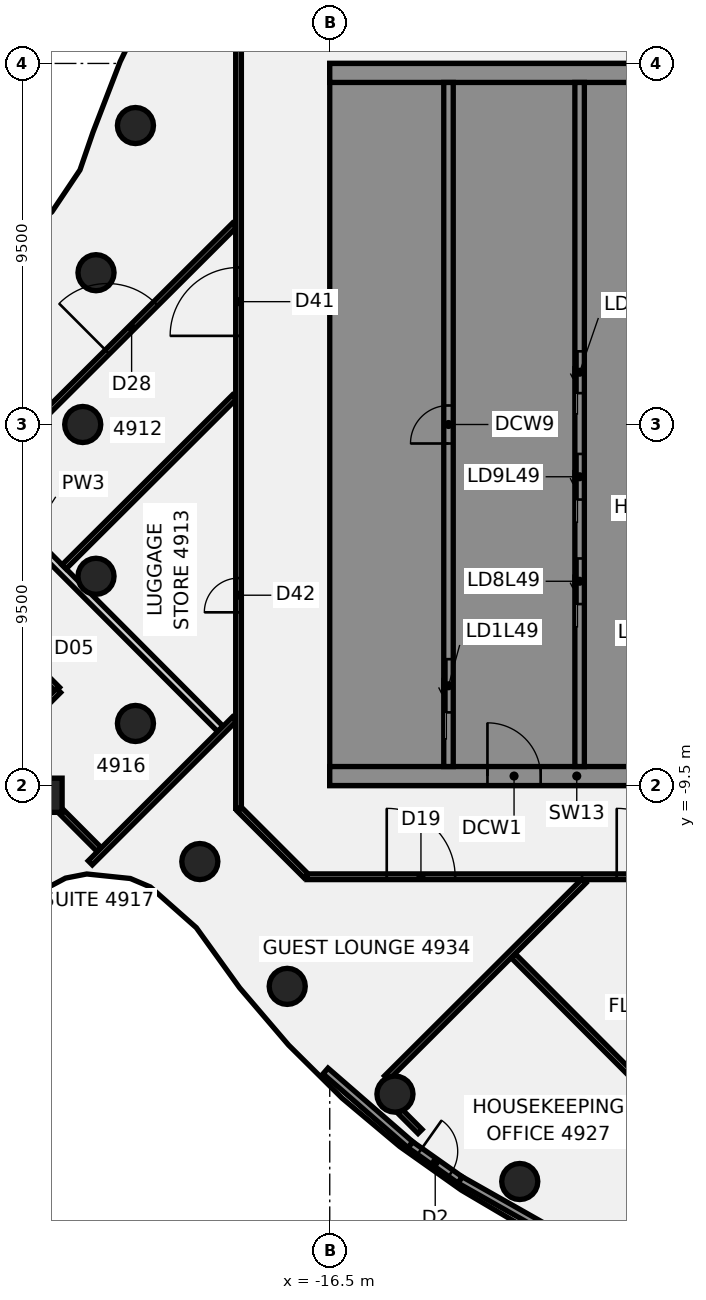
"""IFC4 building model, lengths in metres.
Left out: names, types, materials, properties, quantities, classifications, styles, units other than length and angle.
Written with IfcOpenShell. Run it as: python <this file> out.ifc"""

import sys

from ifc_helpers import new_model, si_unit, direction, frame, frame_2d, origin, origin_2d, place, context, subcontext, project, spatial, polyline, rectangle, circle, outline, extrude, element, fill, save


model = new_model("IFC4")
c1 = context("Model", 3, precision=1e-05, world=origin(), true_north=direction((0.0, 1.0)))
c2 = subcontext(c1, "Body", "Model", "MODEL_VIEW")
j1 = project(units=[si_unit("LENGTHUNIT", "METRE"), si_unit("PLANEANGLEUNIT", "RADIAN")], contexts=[c1])
p1 = place(None, origin())
s1 = spatial("IfcSite", under=j1, at=p1, CompositionType="ELEMENT")
p2 = place(p1, origin())
s2 = spatial("IfcBuilding", under=s1, at=p2, CompositionType="ELEMENT")
p3 = place(p2, frame((0.0, 0.0, 196.9)))
s3 = spatial("IfcBuildingStorey", under=s2, at=p3, CompositionType="ELEMENT", Elevation=196.9)
for number, where, z_axis, x_axis in (
    (1, (-21.613, 7.866, -0.14), (0.0, 0.0, 1.0), (1.0, 0.0, 0.0)),
    (2, (-22.651, 3.994, -0.14), (0.0, 0.0, 1.0), (1.0, 0.0, 0.0)),
    (3, (-23.0, 0.0, -0.14), (0.0, 0.0, 1.0), (1.0, 0.0, 0.0)),
    (4, (-22.651, -3.994, -0.14), (0.0, 0.0, 1.0), (1.0, 0.0, 0.0)),
    (5, (-21.613, -7.866, -0.14), (0.0, 0.0, 1.0), (1.0, 0.0, 0.0)),
    (6, (-19.919, -11.5, -0.14), (0.0, 0.0, 1.0), (1.0, 0.0, 0.0)),
    (7, (-17.619, -14.784, -0.14), (0.0, 0.0, 1.0), (1.0, 0.0, 0.0)),
    (8, (-14.784, -17.619, -0.14), (0.0, 0.0, 1.0), (1.0, 0.0, 0.0)),
    (9, (-11.5, -19.919, -0.14), (0.0, 0.0, 1.0), (1.0, 0.0, 0.0)),
):
    element("IfcColumn", number, at=place(p3, frame(where, z_axis=z_axis, x_axis=x_axis)), inside=s3, PredefinedType="COLUMN", context=c2, shape_type="SweptSolid", body=[
        extrude(circle(Radius=0.475, at=origin_2d()), origin(), (0.0, 0.0, 1.0), 3.6),
    ])
p4 = place(p3, frame((-23.992, -9.756, -0.139), z_axis=(0.04947892899, -0.009624668379, 0.998728792688), x_axis=(-0.705324503584, 0.70765331906, 0.041762718624)))
e10 = element("IfcColumn", 10, at=p4, inside=s3, PredefinedType="COLUMN", context=c2, shape_type="SweptSolid", body=[
    extrude(rectangle(XDim=0.9, YDim=0.9, at=origin_2d()), origin(), (0.0, 0.0, 1.0), 3.602),
])
p5 = place(p3, frame((-29.421, 2.059, 0.0), z_axis=(0.0, 0.0, 1.0), x_axis=(0.706204778192, -0.708007635029, 0.0)))
e11 = element("IfcWall", 11, at=p5, inside=s3, PredefinedType="PARTITIONING", context=c2, shape_type="SweptSolid", body=[
    extrude(rectangle(XDim=14.219, YDim=0.2, at=frame_2d((7.109, 0.0))), origin(), (0.0, 0.0, 1.0), 2.864),
])
p6 = place(p5, frame((5.799, 0.0, 0.0)))
e12 = element("IfcOpeningElement", 12, at=p6, cuts=e11, PredefinedType="OPENING", context=c2, shape_type="SweptSolid", body=[
    extrude(rectangle(XDim=1.4, YDim=2.1, at=frame_2d((0.7, 1.05))), frame((0.0, 0.11, 0.0), z_axis=(0.0, -1.0, 0.0), x_axis=(1.0, 0.0, 0.0)), (0.0, 0.0, 1.0), 0.22),
])
p7 = place(p3, frame((-23.564, -10.185, 0.0), z_axis=(0.0, 0.0, 1.0), x_axis=(0.706156079719, -0.708056206156, 0.0)))
e13 = element("IfcWall", 13, at=p7, inside=s3, PredefinedType="PARTITIONING", context=c2, shape_type="SweptSolid", body=[
    extrude(rectangle(XDim=1.413, YDim=0.15, at=frame_2d((0.707, 0.0))), origin(), (0.0, 0.0, 1.0), 2.864),
])
p8 = place(p3, frame((-25.415, -5.214, 0.0), z_axis=(0.0, 0.0, 1.0), x_axis=(0.706171032538, -0.708041293149, 0.0)))
e14 = element("IfcWall", 14, at=p8, inside=s3, PredefinedType="PARTITIONING", context=c2, shape_type="SweptSolid", body=[
    extrude(rectangle(XDim=2.48, YDim=0.15, at=frame_2d((1.24, 0.0))), origin(), (0.0, 0.0, 1.0), 2.864),
])
p9 = place(p8, frame((0.52, 0.0, 0.0)))
e15 = element("IfcOpeningElement", 15, at=p9, cuts=e14, PredefinedType="OPENING", context=c2, shape_type="SweptSolid", body=[
    extrude(rectangle(XDim=0.9, YDim=2.1, at=frame_2d((0.45, 1.05))), frame((0.0, 0.085, 0.0), z_axis=(0.0, -1.0, 0.0), x_axis=(1.0, 0.0, 0.0)), (0.0, 0.0, 1.0), 0.17),
])
p10 = place(p3, frame((-18.872, -10.128, 0.0), z_axis=(0.0, 0.0, 1.0), x_axis=(0.707106781187, -0.707106781187, 0.0)))
e16 = element("IfcWall", 16, at=p10, inside=s3, PredefinedType="PARTITIONING", context=c2, shape_type="SweptSolid", body=[
    extrude(rectangle(XDim=2.465, YDim=0.15, at=frame_2d((1.232, 0.0))), origin(), (0.0, 0.0, 1.0), 2.864),
])
p11 = place(p3, frame((-14.655, -18.069, 0.0), z_axis=(0.0, 0.0, 1.0), x_axis=(0.706295228239, -0.707917403775, 0.0)))
e17 = element("IfcWall", 17, at=p11, inside=s3, PredefinedType="PARTITIONING", context=c2, shape_type="SweptSolid", body=[
    extrude(rectangle(XDim=0.752, YDim=0.15, at=frame_2d((0.376, 0.0))), origin(), (0.0, 0.0, 1.0), 2.864),
])
p12 = place(p3, frame((-11.671, -13.981, 0.0), z_axis=(0.0, 0.0, 1.0), x_axis=(0.706230859369, -0.707981619306, 0.0)))
e18 = element("IfcWall", 18, at=p12, inside=s3, PredefinedType="PARTITIONING", context=c2, shape_type="SweptSolid", body=[
    extrude(rectangle(XDim=15.2, YDim=0.15, at=frame_2d((7.6, 0.0))), origin(), (0.0, 0.0, 1.0), 2.864),
])
p13 = place(p12, frame((9.37, 0.0, 0.0)))
e19 = element("IfcOpeningElement", 19, at=p13, cuts=e18, PredefinedType="OPENING", context=c2, shape_type="SweptSolid", body=[
    extrude(rectangle(XDim=0.9, YDim=2.1, at=frame_2d((0.45, 1.05))), frame((0.0, 0.085, 0.0), z_axis=(0.0, -1.0, 0.0), x_axis=(1.0, 0.0, 0.0)), (0.0, 0.0, 1.0), 0.17),
])
p14 = place(p3, frame((-17.1, -11.9, 0.0), z_axis=(0.0, 0.0, 1.0), x_axis=(1.0, 0.0, 0.0)))
e20 = element("IfcWall", 20, at=p14, inside=s3, PredefinedType="PARTITIONING", context=c2, shape_type="SweptSolid", body=[
    extrude(rectangle(XDim=34.165, YDim=0.15, at=frame_2d((17.083, 0.0))), origin(), (0.0, 0.0, 1.0), 2.864),
])
p15 = place(p14, frame((8.152, 0.0, 0.0)))
e21 = element("IfcOpeningElement", 21, at=p15, cuts=e20, PredefinedType="OPENING", context=c2, shape_type="SweptSolid", body=[
    extrude(rectangle(XDim=1.8, YDim=2.1, at=frame_2d((0.9, 1.05))), frame((0.0, 0.085, 0.0), z_axis=(0.0, -1.0, 0.0), x_axis=(1.0, 0.0, 0.0)), (0.0, 0.0, 1.0), 0.17),
])
p16 = place(p14, frame((2.1, 0.0, 0.0)))
e22 = element("IfcOpeningElement", 22, at=p16, cuts=e20, PredefinedType="OPENING", context=c2, shape_type="SweptSolid", body=[
    extrude(rectangle(XDim=1.8, YDim=2.1, at=frame_2d((0.9, 1.05))), frame((0.0, 0.085, 0.0), z_axis=(0.0, -1.0, 0.0), x_axis=(1.0, 0.0, 0.0)), (0.0, 0.0, 1.0), 0.17),
])
p17 = place(p14, frame((24.96, 0.0, 0.0)))
e23 = element("IfcOpeningElement", 23, at=p17, cuts=e20, PredefinedType="OPENING", context=c2, shape_type="SweptSolid", body=[
    extrude(rectangle(XDim=1.8, YDim=2.1, at=frame_2d((0.9, 1.05))), frame((0.0, 0.085, 0.0), z_axis=(0.0, -1.0, 0.0), x_axis=(1.0, 0.0, 0.0)), (0.0, 0.0, 1.0), 0.17),
])
p18 = place(p3, frame((-26.751, -10.106, 0.0), z_axis=(0.0, 0.0, 1.0), x_axis=(0.708021518616, 0.706190858888, 0.0)))
e24 = element("IfcWall", 24, at=p18, inside=s3, PredefinedType="PARTITIONING", context=c2, shape_type="SweptSolid", body=[
    extrude(rectangle(XDim=4.401, YDim=0.15, at=frame_2d((2.2, 0.0))), origin(), (0.0, 0.0, 1.0), 2.864),
])
p19 = place(p3, frame((-25.749, -1.48, 0.0), z_axis=(0.0, 0.0, 1.0), x_axis=(0.707978232656, 0.706234254398, 0.0)))
e25 = element("IfcWall", 25, at=p19, inside=s3, PredefinedType="PARTITIONING", context=c2, shape_type="SweptSolid", body=[
    extrude(rectangle(XDim=9.519, YDim=0.15, at=frame_2d((4.76, 0.0))), origin(), (0.0, 0.0, 1.0), 2.864),
])
p20 = place(p19, frame((4.8, 0.0, 0.0)))
e26 = element("IfcOpeningElement", 26, at=p20, cuts=e25, PredefinedType="OPENING", context=c2, shape_type="SweptSolid", body=[
    extrude(rectangle(XDim=1.8, YDim=2.1, at=frame_2d((0.9, 1.05))), frame((0.0, 0.085, 0.0), z_axis=(0.0, -1.0, 0.0), x_axis=(1.0, 0.0, 0.0)), (0.0, 0.0, 1.0), 0.17),
])
p21 = place(p3, frame((-23.49, -3.745, 0.0), z_axis=(0.0, 0.0, 1.0), x_axis=(0.708089983703, 0.706122209663, 0.0)))
e27 = element("IfcWall", 27, at=p21, inside=s3, PredefinedType="PARTITIONING", context=c2, shape_type="SweptSolid", body=[
    extrude(rectangle(XDim=6.328, YDim=0.15, at=frame_2d((3.164, 0.0))), origin(), (0.0, 0.0, 1.0), 2.864),
])
p22 = place(p3, frame((-22.801, -11.534, 0.0), z_axis=(0.0, 0.0, 1.0), x_axis=(0.707926878429, 0.706285731696, 0.0)))
e28 = element("IfcWall", 28, at=p22, inside=s3, PredefinedType="PARTITIONING", context=c2, shape_type="SweptSolid", body=[
    extrude(rectangle(XDim=5.355, YDim=0.15, at=frame_2d((2.678, 0.0))), origin(), (0.0, 0.0, 1.0), 2.864),
])
p23 = place(p3, frame((-15.006, -17.193, 0.0), z_axis=(0.0, 0.0, 1.0), x_axis=(0.708004144821, 0.706208277292, 0.0)))
e29 = element("IfcWall", 29, at=p23, inside=s3, PredefinedType="PARTITIONING", context=c2, shape_type="SweptSolid", body=[
    extrude(rectangle(XDim=7.341, YDim=0.15, at=frame_2d((3.67, 0.0))), origin(), (0.0, 0.0, 1.0), 2.864),
])
p24 = place(p3, frame((-18.9, -10.1, 0.0), z_axis=(0.0, 0.0, 1.0), x_axis=(0.0, 1.0, 0.0)))
e30 = element("IfcWall", 30, at=p24, inside=s3, PredefinedType="PARTITIONING", context=c2, shape_type="SweptSolid", body=[
    extrude(rectangle(XDim=20.2, YDim=0.15, at=frame_2d((10.1, 0.0))), origin(), (0.0, 0.0, 1.0), 2.864),
])
p25 = place(p24, frame((12.432, 0.0, 0.0)))
e31 = element("IfcOpeningElement", 31, at=p25, cuts=e30, PredefinedType="OPENING", context=c2, shape_type="SweptSolid", body=[
    extrude(rectangle(XDim=1.8, YDim=2.1, at=frame_2d((0.9, 1.05))), frame((0.0, 0.085, 0.0), z_axis=(0.0, -1.0, 0.0), x_axis=(1.0, 0.0, 0.0)), (0.0, 0.0, 1.0), 0.17),
])
p26 = place(p24, frame((5.158, 0.0, 0.0)))
e32 = element("IfcOpeningElement", 32, at=p26, cuts=e30, PredefinedType="OPENING", context=c2, shape_type="SweptSolid", body=[
    extrude(rectangle(XDim=0.9, YDim=2.1, at=frame_2d((0.45, 1.05))), frame((0.0, 0.085, 0.0), z_axis=(0.0, -1.0, 0.0), x_axis=(1.0, 0.0, 0.0)), (0.0, 0.0, 1.0), 0.17),
])
p27 = place(p3, frame((-16.611, -17.011, 0.0), z_axis=(0.0, 0.0, 1.0), x_axis=(0.754795534336, -0.65596013701, 0.0)))
e33 = element("IfcWall", 33, at=p27, inside=s3, PredefinedType="SOLIDWALL", context=c2, shape_type="SweptSolid", body=[
    extrude(rectangle(XDim=2.959, YDim=0.2, at=frame_2d((1.479, 0.0))), origin(), (0.0, 0.0, 1.0), 3.46),
])
p28 = place(p3, frame((-13.071, -19.876, 0.0), z_axis=(0.0, 0.0, 1.0), x_axis=(0.870261525936, -0.492589967899, 0.0)))
e34 = element("IfcWall", 34, at=p28, inside=s3, PredefinedType="SOLIDWALL", context=c2, shape_type="SweptSolid", body=[
    extrude(rectangle(XDim=2.959, YDim=0.2, at=frame_2d((1.48, 0.0))), origin(), (0.0, 0.0, 1.0), 3.46),
])
p29 = place(p3, frame((-14.377, -18.952, 0.0), z_axis=(0.0, 0.0, 1.0), x_axis=(0.816354223939, -0.57755153974, 0.0)))
e35 = element("IfcWall", 35, at=p29, inside=s3, PredefinedType="SOLIDWALL", context=c2, shape_type="SweptSolid", body=[
    extrude(rectangle(XDim=1.6, YDim=0.2, at=frame_2d((0.8, 0.0))), origin(), (0.0, 0.0, 1.0), 3.46),
])
p30 = place(p29, frame((0.3, 0.0, 0.0)))
e36 = element("IfcOpeningElement", 36, at=p30, cuts=e35, PredefinedType="OPENING", context=c2, shape_type="SweptSolid", body=[
    extrude(rectangle(XDim=1.0, YDim=2.4, at=frame_2d((0.5, 1.2))), frame((0.0, 0.11, 0.0), z_axis=(0.0, -1.0, 0.0), x_axis=(1.0, 0.0, 0.0)), (0.0, 0.0, 1.0), 0.22),
])
p31 = place(p3, frame((-16.5, -9.25, 0.0), z_axis=(0.0, 0.0, 1.0), x_axis=(1.0, 0.0, 0.0)))
e37 = element("IfcWall", 37, at=p31, inside=s3, PredefinedType="SHEAR", context=c2, shape_type="SweptSolid", body=[
    extrude(rectangle(XDim=13.0, YDim=0.5, at=frame_2d((6.5, 0.0))), origin(), (0.0, 0.0, 1.0), 3.46),
])
p32 = place(p31, frame((4.15, 0.0, 0.0)))
e38 = element("IfcOpeningElement", 38, at=p32, cuts=e37, PredefinedType="OPENING", context=c2, shape_type="SweptSolid", body=[
    extrude(rectangle(XDim=1.4, YDim=2.1, at=frame_2d((0.7, 1.05))), frame((0.0, 0.26, 0.0), z_axis=(0.0, -1.0, 0.0), x_axis=(1.0, 0.0, 0.0)), (0.0, 0.0, 1.0), 0.52),
])
p33 = place(p31, frame((10.125, 0.0, 0.0)))
e39 = element("IfcOpeningElement", 39, at=p33, cuts=e37, PredefinedType="OPENING", context=c2, shape_type="SweptSolid", body=[
    extrude(rectangle(XDim=1.4, YDim=2.1, at=frame_2d((0.7, 1.05))), frame((0.0, 0.26, 0.0), z_axis=(0.0, -1.0, 0.0), x_axis=(1.0, 0.0, 0.0)), (0.0, 0.0, 1.0), 0.52),
])
p34 = place(p3, origin())
e40 = element("IfcWall", 40, at=p34, inside=s3, PredefinedType="SHEAR", context=c2, shape_type="SweptSolid", body=[
    extrude(outline(polyline([(-13.5, -8.125), (-16.0, -8.125), (-16.0, -5.625), (-13.5, -5.625), (-13.5, -5.375), (-16.0, -5.375), (-16.0, 5.375), (-13.5, 5.375), (-13.5, 5.625), (-16.0, 5.625), (-16.0, 8.125), (-13.5, 8.125), (-13.5, 9.0), (-16.0, 9.0), (-16.5, 9.0), (-16.5, -9.0), (-16.0, -9.0), (-13.5, -9.0), (-13.5, -8.125)])), origin(), (0.0, 0.0, 1.0), 3.46),
])
p35 = place(p3, frame((-16.5, 9.25, 0.0), z_axis=(0.0, 0.0, 1.0), x_axis=(1.0, 0.0, 0.0)))
e41 = element("IfcWall", 41, at=p35, inside=s3, PredefinedType="SHEAR", context=c2, shape_type="SweptSolid", body=[
    extrude(rectangle(XDim=13.0, YDim=0.5, at=frame_2d((6.5, 0.0))), origin(), (0.0, 0.0, 1.0), 3.46),
])
p36 = place(p3, origin())
e42 = element("IfcWall", 42, at=p36, inside=s3, PredefinedType="SHEAR", context=c2, shape_type="SweptSolid", body=[
    extrude(outline(polyline([(-9.8, -5.375), (-9.8, -5.625), (-7.5, -5.625), (-7.25, -5.625), (-7.25, 9.0), (-7.5, 9.0), (-9.8, 9.0), (-9.8, 8.125), (-7.5, 8.125), (-7.5, 5.625), (-9.8, 5.625), (-9.8, 5.375), (-7.5, 5.375), (-7.5, 2.875), (-9.8, 2.875), (-9.8, 2.625), (-7.5, 2.625), (-7.5, 0.125), (-9.8, 0.125), (-9.8, -0.125), (-7.5, -0.125), (-7.5, -2.625), (-9.8, -2.625), (-9.8, -2.875), (-7.5, -2.875), (-7.5, -5.375), (-9.8, -5.375)])), origin(), (0.0, 0.0, 1.0), 3.46),
])
p37 = place(p3, origin())
e43 = element("IfcWall", 43, at=p37, inside=s3, PredefinedType="SHEAR", context=c2, shape_type="SweptSolid", body=[
    extrude(outline(polyline([(-7.5, -8.125), (-9.55, -8.125), (-9.55, -5.625), (-9.8, -5.625), (-9.8, -8.125), (-9.8, -9.0), (-7.5, -9.0), (-7.5, -8.125)])), origin(), (0.0, 0.0, 1.0), 3.46),
])
p38 = place(p3, frame((-13.375, -9.0, 0.0), z_axis=(0.0, 0.0, 1.0), x_axis=(0.0, 1.0, 0.0)))
e44 = element("IfcWall", 44, at=p38, inside=s3, PredefinedType="SHEAR", context=c2, shape_type="SweptSolid", body=[
    extrude(rectangle(XDim=18.0, YDim=0.25, at=frame_2d((9.0, 0.0))), origin(), (0.0, 0.0, 1.0), 3.46),
])
p39 = place(p38, frame((1.425, 0.0, 0.0)))
e45 = element("IfcOpeningElement", 45, at=p39, cuts=e44, PredefinedType="OPENING", context=c2, shape_type="SweptSolid", body=[
    extrude(rectangle(XDim=1.4, YDim=2.1, at=frame_2d((0.7, 1.05))), frame((0.0, 0.135, 0.0), z_axis=(0.0, -1.0, 0.0), x_axis=(1.0, 0.0, 0.0)), (0.0, 0.0, 1.0), 0.27),
])
p40 = place(p38, frame((8.5, 0.0, 0.0)))
e46 = element("IfcOpeningElement", 46, at=p40, cuts=e44, PredefinedType="OPENING", context=c2, shape_type="SweptSolid", body=[
    extrude(rectangle(XDim=1.0, YDim=2.1, at=frame_2d((0.5, 1.05))), frame((0.0, 0.135, 0.0), z_axis=(0.0, -1.0, 0.0), x_axis=(1.0, 0.0, 0.0)), (0.0, 0.0, 1.0), 0.27),
])
p41 = place(p3, frame((-9.925, -9.0, 0.0), z_axis=(0.0, 0.0, 1.0), x_axis=(0.0, 1.0, 0.0)))
e47 = element("IfcWall", 47, at=p41, inside=s3, PredefinedType="SHEAR", context=c2, shape_type="SweptSolid", body=[
    extrude(rectangle(XDim=18.0, YDim=0.25, at=frame_2d((9.0, 0.0))), origin(), (0.0, 0.0, 1.0), 3.46),
])
p42 = place(p41, frame((4.275, 0.0, 0.0)))
e48 = element("IfcOpeningElement", 48, at=p42, cuts=e47, PredefinedType="OPENING", context=c2, shape_type="SweptSolid", body=[
    extrude(rectangle(XDim=1.2, YDim=2.1, at=frame_2d((0.6, 1.05))), frame((0.0, 0.135, 0.0), z_axis=(0.0, -1.0, 0.0), x_axis=(1.0, 0.0, 0.0)), (0.0, 0.0, 1.0), 0.27),
])
p43 = place(p41, frame((7.025, 0.0, 0.0)))
e49 = element("IfcOpeningElement", 49, at=p43, cuts=e47, PredefinedType="OPENING", context=c2, shape_type="SweptSolid", body=[
    extrude(rectangle(XDim=1.2, YDim=2.1, at=frame_2d((0.6, 1.05))), frame((0.0, 0.135, 0.0), z_axis=(0.0, -1.0, 0.0), x_axis=(1.0, 0.0, 0.0)), (0.0, 0.0, 1.0), 0.27),
])
p44 = place(p41, frame((9.825, 0.0, 0.0)))
e50 = element("IfcOpeningElement", 50, at=p44, cuts=e47, PredefinedType="OPENING", context=c2, shape_type="SweptSolid", body=[
    extrude(rectangle(XDim=1.1, YDim=2.1, at=frame_2d((0.55, 1.05))), frame((0.0, 0.135, 0.0), z_axis=(0.0, -1.0, 0.0), x_axis=(1.0, 0.0, 0.0)), (0.0, 0.0, 1.0), 0.27),
])
p45 = place(p15, origin())
e51 = element("IfcDoor", 51, at=p45, inside=s3, OperationType="DOUBLE_DOOR_SINGLE_SWING", PredefinedType="DOOR", context=c2, shape_type="SweptSolid", body=[
    extrude(rectangle(XDim=1.8, YDim=2.1, at=frame_2d((0.9, 1.05))), frame((0.0, 0.025, 0.0), z_axis=(0.0, -1.0, 0.0), x_axis=(1.0, 0.0, 0.0)), (0.0, 0.0, 1.0), 0.05),
])
fill(e21, e51)
p46 = place(p16, frame((1.8, 0.0, 0.0), z_axis=(0.0, 0.0, 1.0), x_axis=(-1.0, 0.0, 0.0)))
e52 = element("IfcDoor", 52, at=p46, inside=s3, OperationType="DOUBLE_DOOR_SINGLE_SWING", PredefinedType="DOOR", context=c2, shape_type="SweptSolid", body=[
    extrude(rectangle(XDim=1.8, YDim=2.1, at=frame_2d((0.9, 1.05))), frame((0.0, 0.025, 0.0), z_axis=(0.0, -1.0, 0.0), x_axis=(1.0, 0.0, 0.0)), (0.0, 0.0, 1.0), 0.05),
])
fill(e22, e52)
p47 = place(p20, origin())
e53 = element("IfcDoor", 53, at=p47, inside=s3, OperationType="DOUBLE_DOOR_SINGLE_SWING", PredefinedType="DOOR", context=c2, shape_type="SweptSolid", body=[
    extrude(rectangle(XDim=1.8, YDim=2.1, at=frame_2d((0.9, 1.05))), frame((0.0, 0.025, 0.0), z_axis=(0.0, -1.0, 0.0), x_axis=(1.0, 0.0, 0.0)), (0.0, 0.0, 1.0), 0.05),
])
fill(e26, e53)
p48 = place(p25, frame((1.8, 0.0, 0.0), z_axis=(0.0, 0.0, 1.0), x_axis=(-1.0, 0.0, 0.0)))
e54 = element("IfcDoor", 54, at=p48, inside=s3, OperationType="DOUBLE_DOOR_SINGLE_SWING", PredefinedType="DOOR", context=c2, shape_type="SweptSolid", body=[
    extrude(rectangle(XDim=1.8, YDim=2.1, at=frame_2d((0.9, 1.05))), frame((0.0, 0.025, 0.0), z_axis=(0.0, -1.0, 0.0), x_axis=(1.0, 0.0, 0.0)), (0.0, 0.0, 1.0), 0.05),
])
fill(e31, e54)
p49 = place(p26, origin())
e55 = element("IfcDoor", 55, at=p49, inside=s3, OperationType="SINGLE_SWING_RIGHT", PredefinedType="DOOR", context=c2, shape_type="SweptSolid", body=[
    extrude(rectangle(XDim=0.9, YDim=2.1, at=frame_2d((0.45, 1.05))), frame((0.0, 0.025, 0.0), z_axis=(0.0, -1.0, 0.0), x_axis=(1.0, 0.0, 0.0)), (0.0, 0.0, 1.0), 0.05),
])
fill(e32, e55)
p50 = place(p30, origin())
e56 = element("IfcDoor", 56, at=p50, inside=s3, OperationType="SINGLE_SWING_LEFT", PredefinedType="DOOR", context=c2, shape_type="SweptSolid", body=[
    extrude(rectangle(XDim=1.0, YDim=2.4, at=frame_2d((0.5, 1.2))), frame((0.0, 0.025, 0.0), z_axis=(0.0, -1.0, 0.0), x_axis=(1.0, 0.0, 0.0)), (0.0, 0.0, 1.0), 0.05),
])
fill(e36, e56)
p51 = place(p32, origin())
e57 = element("IfcDoor", 57, at=p51, inside=s3, OperationType="SINGLE_SWING_LEFT", PredefinedType="DOOR", context=c2, shape_type="SweptSolid", body=[
    extrude(rectangle(XDim=1.4, YDim=2.1, at=frame_2d((0.7, 1.05))), frame((0.0, 0.025, 0.0), z_axis=(0.0, -1.0, 0.0), x_axis=(1.0, 0.0, 0.0)), (0.0, 0.0, 1.0), 0.05),
])
fill(e38, e57)
p52 = place(p39, origin())
e58 = element("IfcDoor", 58, at=p52, inside=s3, OperationType="SLIDING_TO_LEFT", PredefinedType="DOOR", context=c2, shape_type="SweptSolid", body=[
    extrude(rectangle(XDim=1.4, YDim=2.1, at=frame_2d((0.7, 1.05))), frame((0.0, 0.025, 0.0), z_axis=(0.0, -1.0, 0.0), x_axis=(1.0, 0.0, 0.0)), (0.0, 0.0, 1.0), 0.05),
])
fill(e45, e58)
p53 = place(p42, origin())
e59 = element("IfcDoor", 59, at=p53, inside=s3, OperationType="SLIDING_TO_LEFT", PredefinedType="DOOR", context=c2, shape_type="SweptSolid", body=[
    extrude(rectangle(XDim=1.2, YDim=2.1, at=frame_2d((0.6, 1.05))), frame((0.0, 0.025, 0.0), z_axis=(0.0, -1.0, 0.0), x_axis=(1.0, 0.0, 0.0)), (0.0, 0.0, 1.0), 0.05),
])
fill(e48, e59)
p54 = place(p43, origin())
e60 = element("IfcDoor", 60, at=p54, inside=s3, OperationType="SLIDING_TO_LEFT", PredefinedType="DOOR", context=c2, shape_type="SweptSolid", body=[
    extrude(rectangle(XDim=1.2, YDim=2.1, at=frame_2d((0.6, 1.05))), frame((0.0, 0.025, 0.0), z_axis=(0.0, -1.0, 0.0), x_axis=(1.0, 0.0, 0.0)), (0.0, 0.0, 1.0), 0.05),
])
fill(e49, e60)
p55 = place(p44, origin())
e61 = element("IfcDoor", 61, at=p55, inside=s3, OperationType="SLIDING_TO_LEFT", PredefinedType="DOOR", context=c2, shape_type="SweptSolid", body=[
    extrude(rectangle(XDim=1.1, YDim=2.1, at=frame_2d((0.55, 1.05))), frame((0.0, 0.025, 0.0), z_axis=(0.0, -1.0, 0.0), x_axis=(1.0, 0.0, 0.0)), (0.0, 0.0, 1.0), 0.05),
])
fill(e50, e61)
p56 = place(p40, origin())
e62 = element("IfcDoor", 62, at=p56, inside=s3, OperationType="SINGLE_SWING_LEFT", PredefinedType="DOOR", context=c2, shape_type="SweptSolid", body=[
    extrude(rectangle(XDim=1.0, YDim=2.1, at=frame_2d((0.5, 1.05))), frame((0.0, 0.025, 0.0), z_axis=(0.0, -1.0, 0.0), x_axis=(1.0, 0.0, 0.0)), (0.0, 0.0, 1.0), 0.05),
])
fill(e46, e62)
save(model, sys.argv[1])
